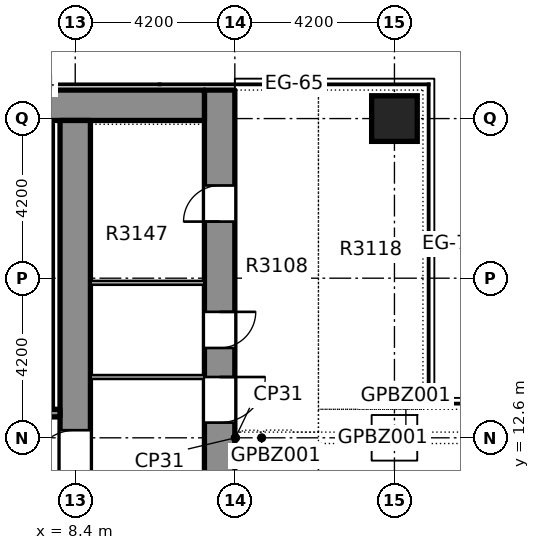
"""IFC4 building model, lengths in metres.
Left out: names, types, materials, properties, quantities, classifications, styles, units other than length and angle.
Written with IfcOpenShell. Run it as: python <this file> out.ifc"""

import sys

from ifc_helpers import new_model, si_unit, direction, frame, frame_2d, origin, origin_2d, place, context, subcontext, project, spatial, rectangle, extrude, element, fill, save


model = new_model("IFC4")
c1 = context("Model", 3, precision=1e-05, world=origin(), true_north=direction((0.0, 1.0)))
c2 = subcontext(c1, "Body", "Model", "MODEL_VIEW")
j1 = project(units=[si_unit("LENGTHUNIT", "METRE"), si_unit("PLANEANGLEUNIT", "RADIAN")], contexts=[c1])
p1 = place(None, origin())
s1 = spatial("IfcSite", under=j1, at=p1, CompositionType="ELEMENT")
p2 = place(p1, origin())
s2 = spatial("IfcBuilding", under=s1, at=p2, CompositionType="ELEMENT")
p3 = place(p2, frame((0.0, 0.0, 121.8)))
s3 = spatial("IfcBuildingStorey", under=s2, at=p3, CompositionType="ELEMENT", Elevation=121.8)
p4 = place(p3, frame((12.2, -8.4, 0.0), z_axis=(0.0, 0.0, 1.0), x_axis=(0.0, 1.0, 0.0)))
e1 = element("IfcWall", 1, at=p4, inside=s3, PredefinedType="SHEAR", context=c2, shape_type="SweptSolid", body=[
    extrude(rectangle(XDim=30.15, YDim=0.8, at=frame_2d((15.075, 0.0))), origin(), (0.0, 0.0, 1.0), 6.1),
])
p5 = place(p4, frame((4.512, 0.0, 0.0)))
e2 = element("IfcOpeningElement", 2, at=p5, cuts=e1, PredefinedType="OPENING", context=c2, shape_type="SweptSolid", body=[
    extrude(rectangle(XDim=0.95, YDim=2.1, at=frame_2d((0.475, 1.05))), frame((0.0, 0.41, 0.0), z_axis=(0.0, -1.0, 0.0), x_axis=(1.0, 0.0, 0.0)), (0.0, 0.0, 1.0), 0.82),
])
p6 = place(p4, frame((9.768, 0.0, 0.0)))
e3 = element("IfcOpeningElement", 3, at=p6, cuts=e1, PredefinedType="OPENING", context=c2, shape_type="SweptSolid", body=[
    extrude(rectangle(XDim=0.95, YDim=2.1, at=frame_2d((0.475, 1.05))), frame((0.0, 0.41, 0.0), z_axis=(0.0, -1.0, 0.0), x_axis=(1.0, 0.0, 0.0)), (0.0, 0.0, 1.0), 0.82),
])
p7 = place(p4, frame((15.481, 0.0, 0.0)))
e4 = element("IfcOpeningElement", 4, at=p7, cuts=e1, PredefinedType="OPENING", context=c2, shape_type="SweptSolid", body=[
    extrude(rectangle(XDim=0.95, YDim=2.1, at=frame_2d((0.475, 1.05))), frame((0.0, 0.41, 0.0), z_axis=(0.0, -1.0, 0.0), x_axis=(1.0, 0.0, 0.0)), (0.0, 0.0, 1.0), 0.82),
])
p8 = place(p4, frame((23.364, 0.0, 0.0)))
e5 = element("IfcOpeningElement", 5, at=p8, cuts=e1, PredefinedType="OPENING", context=c2, shape_type="SweptSolid", body=[
    extrude(rectangle(XDim=0.95, YDim=2.1, at=frame_2d((0.475, 1.05))), frame((0.0, 0.41, 0.0), z_axis=(0.0, -1.0, 0.0), x_axis=(1.0, 0.0, 0.0)), (0.0, 0.0, 1.0), 0.82),
])
p9 = place(p4, frame((26.689, 0.0, 0.0)))
e6 = element("IfcOpeningElement", 6, at=p9, cuts=e1, PredefinedType="OPENING", context=c2, shape_type="SweptSolid", body=[
    extrude(rectangle(XDim=0.95, YDim=2.1, at=frame_2d((0.475, 1.05))), frame((0.0, 0.41, 0.0), z_axis=(0.0, -1.0, 0.0), x_axis=(1.0, 0.0, 0.0)), (0.0, 0.0, 1.0), 0.82),
])
p10 = place(p4, frame((21.4, 0.0, 0.0)))
e7 = element("IfcOpeningElement", 7, at=p10, cuts=e1, PredefinedType="OPENING", context=c2, shape_type="SweptSolid", body=[
    extrude(rectangle(XDim=1.2, YDim=2.1, at=frame_2d((0.6, 1.05))), frame((0.0, 0.41, 0.0), z_axis=(0.0, -1.0, 0.0), x_axis=(1.0, 0.0, 0.0)), (0.0, 0.0, 1.0), 0.82),
])
p11 = place(p3, frame((-11.8, 21.35, 0.0), z_axis=(0.0, 0.0, 1.0), x_axis=(1.0, 0.0, 0.0)))
e8 = element("IfcWall", 8, at=p11, inside=s3, PredefinedType="SHEAR", context=c2, shape_type="SweptSolid", body=[
    extrude(rectangle(XDim=23.6, YDim=0.8, at=frame_2d((11.8, 0.0))), origin(), (0.0, 0.0, 1.0), 6.1),
])
p12 = place(p3, frame((8.4, -7.6, 0.0), z_axis=(0.0, 0.0, 1.0), x_axis=(0.0, 1.0, 0.0)))
e9 = element("IfcWall", 9, at=p12, inside=s3, PredefinedType="SHEAR", context=c2, shape_type="SweptSolid", body=[
    extrude(rectangle(XDim=28.55, YDim=0.8, at=frame_2d((14.275, 0.0))), origin(), (0.0, 0.0, 1.0), 6.1),
])
p13 = place(p12, frame((19.2, 0.0, 0.0)))
e10 = element("IfcOpeningElement", 10, at=p13, cuts=e9, PredefinedType="OPENING", context=c2, shape_type="SweptSolid", body=[
    extrude(rectangle(XDim=1.2, YDim=2.1, at=frame_2d((0.6, 1.05))), frame((0.0, 0.41, 0.0), z_axis=(0.0, -1.0, 0.0), x_axis=(1.0, 0.0, 0.0)), (0.0, 0.0, 1.0), 0.82),
])
p14 = place(p3, frame((16.8, 21.0, -0.45), z_axis=(0.0, 0.0, 1.0), x_axis=(1.0, 0.0, 0.0)))
e11 = element("IfcColumn", 11, at=p14, inside=s3, PredefinedType="COLUMN", context=c2, shape_type="SweptSolid", body=[
    extrude(rectangle(XDim=1.2, YDim=1.2, at=origin_2d()), origin(), (0.0, 0.0, 1.0), 6.55),
])
p15 = place(p3, frame((3.425, 13.25, 0.0), z_axis=(0.0, 0.0, 1.0), x_axis=(1.0, 0.0, 0.0)))
e12 = element("IfcWall", 12, at=p15, inside=s3, PredefinedType="SOLIDWALL", context=c2, shape_type="SweptSolid", body=[
    extrude(rectangle(XDim=4.574, YDim=0.2, at=frame_2d((2.287, 0.0))), origin(), (0.0, 0.0, 1.0), 6.1),
])
p16 = place(p15, frame((1.825, 0.0, 0.0)))
e13 = element("IfcOpeningElement", 13, at=p16, cuts=e12, PredefinedType="OPENING", context=c2, shape_type="SweptSolid", body=[
    extrude(rectangle(XDim=1.2, YDim=2.1, at=frame_2d((0.6, 1.05))), frame((0.0, 0.11, 0.0), z_axis=(0.0, -1.0, 0.0), x_axis=(1.0, 0.0, 0.0)), (0.0, 0.0, 1.0), 0.22),
])
for number, where, z_axis, x_axis in (
    (14, (8.801, 14.2, 0.0), (0.0, 0.0, 1.0), (1.0, 0.0, 0.0)),
    (15, (8.801, 16.678, 0.0), (0.0, 0.0, 1.0), (1.0, 0.0, 0.0)),
):
    element("IfcWall", number, at=place(p3, frame(where, z_axis=z_axis, x_axis=x_axis)), inside=s3, PredefinedType="PARTITIONING", context=c2, shape_type="SweptSolid", body=[
        extrude(rectangle(XDim=2.998, YDim=0.1, at=frame_2d((1.499, 0.0))), origin(), (0.0, 0.0, 1.0), 6.1),
    ])
p17 = place(p8, origin())
e16 = element("IfcDoor", 16, at=p17, inside=s3, OperationType="SINGLE_SWING_LEFT", PredefinedType="DOOR", context=c2, shape_type="SweptSolid", body=[
    extrude(rectangle(XDim=0.95, YDim=2.1, at=frame_2d((0.475, 1.05))), frame((0.0, 0.025, 0.0), z_axis=(0.0, -1.0, 0.0), x_axis=(1.0, 0.0, 0.0)), (0.0, 0.0, 1.0), 0.05),
])
fill(e5, e16)
p18 = place(p9, origin())
e17 = element("IfcDoor", 17, at=p18, inside=s3, OperationType="SINGLE_SWING_LEFT", PredefinedType="DOOR", context=c2, shape_type="SweptSolid", body=[
    extrude(rectangle(XDim=0.95, YDim=2.1, at=frame_2d((0.475, 1.05))), frame((0.0, 0.025, 0.0), z_axis=(0.0, -1.0, 0.0), x_axis=(1.0, 0.0, 0.0)), (0.0, 0.0, 1.0), 0.05),
])
fill(e6, e17)
p19 = place(p10, origin())
e18 = element("IfcDoor", 18, at=p19, inside=s3, OperationType="SINGLE_SWING_LEFT", PredefinedType="DOOR", context=c2, shape_type="SweptSolid", body=[
    extrude(rectangle(XDim=1.2, YDim=2.1, at=frame_2d((0.6, 1.05))), frame((0.0, 0.025, 0.0), z_axis=(0.0, -1.0, 0.0), x_axis=(1.0, 0.0, 0.0)), (0.0, 0.0, 1.0), 0.05),
])
fill(e7, e18)
p20 = place(p13, origin())
e19 = element("IfcDoor", 19, at=p20, inside=s3, OperationType="SINGLE_SWING_LEFT", PredefinedType="DOOR", context=c2, shape_type="SweptSolid", body=[
    extrude(rectangle(XDim=1.2, YDim=2.1, at=frame_2d((0.6, 1.05))), frame((0.0, 0.025, 0.0), z_axis=(0.0, -1.0, 0.0), x_axis=(1.0, 0.0, 0.0)), (0.0, 0.0, 1.0), 0.05),
])
fill(e10, e19)
save(model, sys.argv[1])
